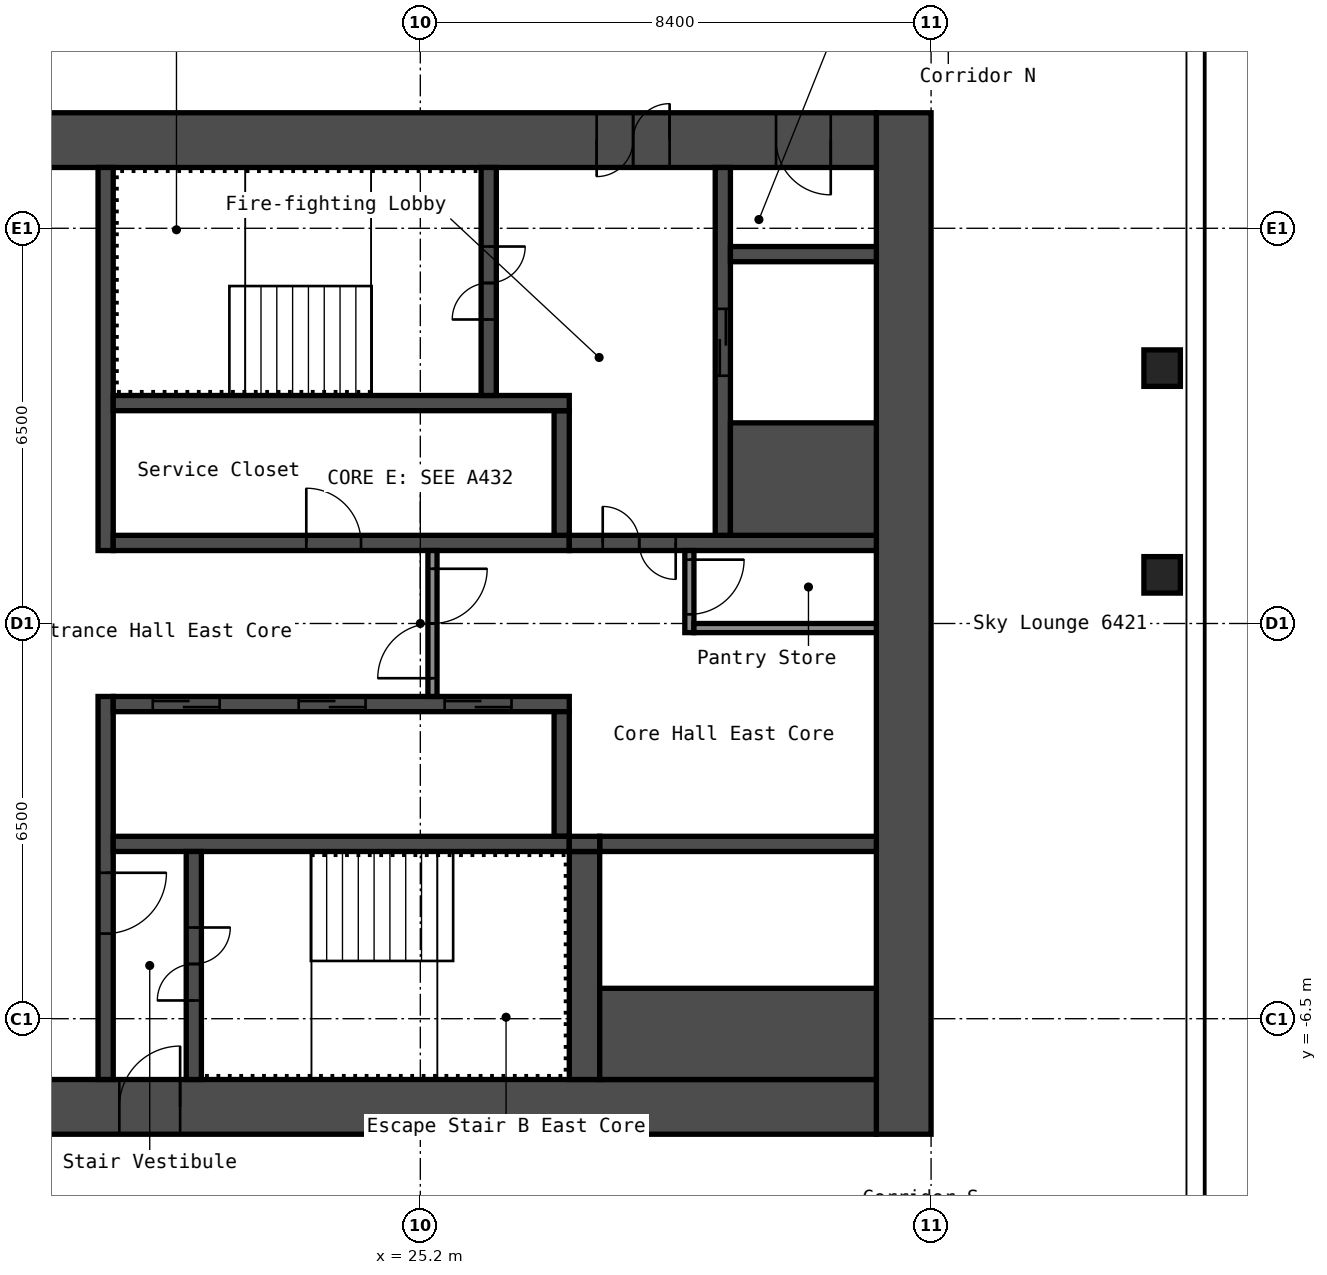
"""IFC4 building model, lengths in metres.
Left out: names, types, materials, properties, quantities, classifications, styles, units other than length and angle.
Written with IfcOpenShell. Run it as: python <this file> out.ifc"""

import sys

from ifc_helpers import new_model, si_unit, direction, frame, frame_2d, origin, origin_2d, place, context, subcontext, project, spatial, rectangle, hollow_rectangle, extrude, element, fill, save


model = new_model("IFC4")
c1 = context("Model", 3, precision=1e-05, world=origin(), true_north=direction((0.0, 1.0)))
c2 = subcontext(c1, "Body", "Model", "MODEL_VIEW")
j1 = project(units=[si_unit("LENGTHUNIT", "METRE"), si_unit("PLANEANGLEUNIT", "RADIAN")], contexts=[c1])
p1 = place(None, origin())
s1 = spatial("IfcSite", under=j1, at=p1, CompositionType="ELEMENT")
p2 = place(p1, origin())
s2 = spatial("IfcBuilding", under=s1, at=p2, CompositionType="ELEMENT")
p3 = place(p2, frame((0.0, 0.0, 225.0)))
s3 = spatial("IfcBuildingStorey", under=s2, at=p3, CompositionType="ELEMENT", Elevation=225.0)
for number, where, z_axis, x_axis in (
    (1, (37.4, 0.8, 0.0), (0.0, 0.0, 1.0), (1.0, 0.0, 0.0)),
    (2, (37.4, 4.2, 0.0), (0.0, 0.0, 1.0), (1.0, 0.0, 0.0)),
):
    element("IfcColumn", number, at=place(p3, frame(where, z_axis=z_axis, x_axis=x_axis)), inside=s3, PredefinedType="COLUMN", context=c2, shape_type="SweptSolid", body=[
        extrude(hollow_rectangle(XDim=0.6, YDim=0.6, WallThickness=0.025, InnerFilletRadius=0.038, OuterFilletRadius=0.062, at=origin_2d()), origin(), (0.0, 0.0, 1.0), 2.9),
    ])
p4 = place(p3, frame((33.15, -8.4, 0.0), z_axis=(0.0, 0.0, 1.0), x_axis=(0.0, 1.0, 0.0)))
e3 = element("IfcWall", 3, at=p4, inside=s3, PredefinedType="SHEAR", context=c2, shape_type="SweptSolid", body=[
    extrude(rectangle(XDim=16.8, YDim=0.9, at=frame_2d((8.4, 0.0))), origin(), (0.0, 0.0, 1.0), 2.9),
])
p5 = place(p3, frame((17.7, 7.95, 0.0), z_axis=(0.0, 0.0, 1.0), x_axis=(1.0, 0.0, 0.0)))
e4 = element("IfcWall", 4, at=p5, inside=s3, PredefinedType="SHEAR", context=c2, shape_type="SweptSolid", body=[
    extrude(rectangle(XDim=15.0, YDim=0.9, at=frame_2d((7.5, 0.0))), origin(), (0.0, 0.0, 1.0), 2.9),
])
p6 = place(p5, frame((10.4, 0.0, 0.0)))
e5 = element("IfcOpeningElement", 5, at=p6, cuts=e4, PredefinedType="OPENING", context=c2, shape_type="SweptSolid", body=[
    extrude(rectangle(XDim=1.2, YDim=2.1, at=frame_2d((0.6, 1.05))), frame((0.0, 0.46, 0.0), z_axis=(0.0, -1.0, 0.0), x_axis=(1.0, 0.0, 0.0)), (0.0, 0.0, 1.0), 0.92),
])
p7 = place(p5, frame((13.35, 0.0, 0.0)))
e6 = element("IfcOpeningElement", 6, at=p7, cuts=e4, PredefinedType="OPENING", context=c2, shape_type="SweptSolid", body=[
    extrude(rectangle(XDim=0.9, YDim=2.1, at=frame_2d((0.45, 1.05))), frame((0.0, 0.46, 0.0), z_axis=(0.0, -1.0, 0.0), x_axis=(1.0, 0.0, 0.0)), (0.0, 0.0, 1.0), 0.92),
])
p8 = place(p3, frame((17.7, -7.95, 0.0), z_axis=(0.0, 0.0, 1.0), x_axis=(1.0, 0.0, 0.0)))
e7 = element("IfcWall", 7, at=p8, inside=s3, PredefinedType="SHEAR", context=c2, shape_type="SweptSolid", body=[
    extrude(rectangle(XDim=15.0, YDim=0.9, at=frame_2d((7.5, 0.0))), origin(), (0.0, 0.0, 1.0), 2.9),
])
p9 = place(p8, frame((2.55, 0.0, 0.0)))
e8 = element("IfcOpeningElement", 8, at=p9, cuts=e7, PredefinedType="OPENING", context=c2, shape_type="SweptSolid", body=[
    extrude(rectangle(XDim=1.0, YDim=2.1, at=frame_2d((0.5, 1.05))), frame((0.0, 0.46, 0.0), z_axis=(0.0, -1.0, 0.0), x_axis=(1.0, 0.0, 0.0)), (0.0, 0.0, 1.0), 0.92),
])
p10 = place(p3, frame((20.025, 1.2, 0.0), z_axis=(0.0, 0.0, 1.0), x_axis=(0.0, 1.0, 0.0)))
e9 = element("IfcWall", 9, at=p10, inside=s3, PredefinedType="SHEAR", context=c2, shape_type="SweptSolid", body=[
    extrude(rectangle(XDim=6.3, YDim=0.25, at=frame_2d((3.15, 0.0))), origin(), (0.0, 0.0, 1.0), 2.9),
])
p11 = place(p3, frame((20.025, -7.5, 0.0), z_axis=(0.0, 0.0, 1.0), x_axis=(0.0, 1.0, 0.0)))
e10 = element("IfcWall", 10, at=p11, inside=s3, PredefinedType="SHEAR", context=c2, shape_type="SweptSolid", body=[
    extrude(rectangle(XDim=6.3, YDim=0.25, at=frame_2d((3.15, 0.0))), origin(), (0.0, 0.0, 1.0), 2.9),
])
p12 = place(p11, frame((2.4, 0.0, 0.0)))
e11 = element("IfcOpeningElement", 11, at=p12, cuts=e10, PredefinedType="OPENING", context=c2, shape_type="SweptSolid", body=[
    extrude(rectangle(XDim=1.0, YDim=2.1, at=frame_2d((0.5, 1.05))), frame((0.0, 0.135, 0.0), z_axis=(0.0, -1.0, 0.0), x_axis=(1.0, 0.0, 0.0)), (0.0, 0.0, 1.0), 0.27),
])
p13 = place(p3, frame((20.15, 1.325, 0.0), z_axis=(0.0, 0.0, 1.0), x_axis=(1.0, 0.0, 0.0)))
e12 = element("IfcWall", 12, at=p13, inside=s3, PredefinedType="SHEAR", context=c2, shape_type="SweptSolid", body=[
    extrude(rectangle(XDim=7.5, YDim=0.25, at=frame_2d((3.75, 0.0))), origin(), (0.0, 0.0, 1.0), 2.9),
])
p14 = place(p13, frame((3.175, 0.0, 0.0)))
e13 = element("IfcOpeningElement", 13, at=p14, cuts=e12, PredefinedType="OPENING", context=c2, shape_type="SweptSolid", body=[
    extrude(rectangle(XDim=0.9, YDim=2.1, at=frame_2d((0.45, 1.05))), frame((0.0, 0.135, 0.0), z_axis=(0.0, -1.0, 0.0), x_axis=(1.0, 0.0, 0.0)), (0.0, 0.0, 1.0), 0.27),
])
p15 = place(p3, frame((27.525, 1.45, 0.0), z_axis=(0.0, 0.0, 1.0), x_axis=(0.0, 1.0, 0.0)))
e14 = element("IfcWall", 14, at=p15, inside=s3, PredefinedType="SHEAR", context=c2, shape_type="SweptSolid", body=[
    extrude(rectangle(XDim=2.05, YDim=0.25, at=frame_2d((1.025, 0.0))), origin(), (0.0, 0.0, 1.0), 2.9),
])
p16 = place(p3, frame((20.15, 3.625, 0.0), z_axis=(0.0, 0.0, 1.0), x_axis=(1.0, 0.0, 0.0)))
e15 = element("IfcWall", 15, at=p16, inside=s3, PredefinedType="SHEAR", context=c2, shape_type="SweptSolid", body=[
    extrude(rectangle(XDim=7.5, YDim=0.25, at=frame_2d((3.75, 0.0))), origin(), (0.0, 0.0, 1.0), 2.9),
])
p17 = place(p3, frame((26.325, 3.75, 0.0), z_axis=(0.0, 0.0, 1.0), x_axis=(0.0, 1.0, 0.0)))
e16 = element("IfcWall", 16, at=p17, inside=s3, PredefinedType="SHEAR", context=c2, shape_type="SweptSolid", body=[
    extrude(rectangle(XDim=3.75, YDim=0.25, at=frame_2d((1.875, 0.0))), origin(), (0.0, 0.0, 1.0), 2.9),
])
p18 = place(p17, frame((1.25, 0.0, 0.0)))
e17 = element("IfcOpeningElement", 17, at=p18, cuts=e16, PredefinedType="OPENING", context=c2, shape_type="SweptSolid", body=[
    extrude(rectangle(XDim=1.2, YDim=2.1, at=frame_2d((0.6, 1.05))), frame((0.0, 0.135, 0.0), z_axis=(0.0, -1.0, 0.0), x_axis=(1.0, 0.0, 0.0)), (0.0, 0.0, 1.0), 0.27),
])
p19 = place(p3, frame((27.65, 1.325, 0.0), z_axis=(0.0, 0.0, 1.0), x_axis=(1.0, 0.0, 0.0)))
e18 = element("IfcWall", 18, at=p19, inside=s3, PredefinedType="SHEAR", context=c2, shape_type="SweptSolid", body=[
    extrude(rectangle(XDim=5.05, YDim=0.25, at=frame_2d((2.525, 0.0))), origin(), (0.0, 0.0, 1.0), 2.9),
])
p20 = place(p19, frame((0.55, 0.0, 0.0)))
e19 = element("IfcOpeningElement", 19, at=p20, cuts=e18, PredefinedType="OPENING", context=c2, shape_type="SweptSolid", body=[
    extrude(rectangle(XDim=1.2, YDim=2.1, at=frame_2d((0.6, 1.05))), frame((0.0, 0.135, 0.0), z_axis=(0.0, -1.0, 0.0), x_axis=(1.0, 0.0, 0.0)), (0.0, 0.0, 1.0), 0.27),
])
p21 = place(p3, frame((30.175, 1.45, 0.0), z_axis=(0.0, 0.0, 1.0), x_axis=(0.0, 1.0, 0.0)))
e20 = element("IfcWall", 20, at=p21, inside=s3, PredefinedType="SHEAR", context=c2, shape_type="SweptSolid", body=[
    extrude(rectangle(XDim=6.05, YDim=0.25, at=frame_2d((3.025, 0.0))), origin(), (0.0, 0.0, 1.0), 2.9),
])
p22 = place(p21, frame((2.625, 0.0, 0.0)))
e21 = element("IfcOpeningElement", 21, at=p22, cuts=e20, PredefinedType="OPENING", context=c2, shape_type="SweptSolid", body=[
    extrude(rectangle(XDim=1.1, YDim=2.1, at=frame_2d((0.55, 1.05))), frame((0.0, 0.135, 0.0), z_axis=(0.0, -1.0, 0.0), x_axis=(1.0, 0.0, 0.0)), (0.0, 0.0, 1.0), 0.27),
])
p23 = place(p3, frame((30.3, 2.375, 0.0), z_axis=(0.0, 0.0, 1.0), x_axis=(1.0, 0.0, 0.0)))
e22 = element("IfcWall", 22, at=p23, inside=s3, PredefinedType="SHEAR", context=c2, shape_type="SweptSolid", body=[
    extrude(rectangle(XDim=2.4, YDim=1.85, at=frame_2d((1.2, 0.0))), origin(), (0.0, 0.0, 1.0), 2.9),
])
p24 = place(p3, frame((30.3, 6.075, 0.0), z_axis=(0.0, 0.0, 1.0), x_axis=(1.0, 0.0, 0.0)))
e23 = element("IfcWall", 23, at=p24, inside=s3, PredefinedType="SHEAR", context=c2, shape_type="SweptSolid", body=[
    extrude(rectangle(XDim=2.4, YDim=0.25, at=frame_2d((1.2, 0.0))), origin(), (0.0, 0.0, 1.0), 2.9),
])
p25 = place(p3, frame((20.15, -1.325, 0.0), z_axis=(0.0, 0.0, 1.0), x_axis=(1.0, 0.0, 0.0)))
e24 = element("IfcWall", 24, at=p25, inside=s3, PredefinedType="SHEAR", context=c2, shape_type="SweptSolid", body=[
    extrude(rectangle(XDim=7.5, YDim=0.25, at=frame_2d((3.75, 0.0))), origin(), (0.0, 0.0, 1.0), 2.9),
])
p26 = place(p25, frame((0.65, 0.0, 0.0)))
e25 = element("IfcOpeningElement", 25, at=p26, cuts=e24, PredefinedType="OPENING", context=c2, shape_type="SweptSolid", body=[
    extrude(rectangle(XDim=1.1, YDim=2.1, at=frame_2d((0.55, 1.05))), frame((0.0, 0.135, 0.0), z_axis=(0.0, -1.0, 0.0), x_axis=(1.0, 0.0, 0.0)), (0.0, 0.0, 1.0), 0.27),
])
p27 = place(p25, frame((3.05, 0.0, 0.0)))
e26 = element("IfcOpeningElement", 26, at=p27, cuts=e24, PredefinedType="OPENING", context=c2, shape_type="SweptSolid", body=[
    extrude(rectangle(XDim=1.1, YDim=2.1, at=frame_2d((0.55, 1.05))), frame((0.0, 0.135, 0.0), z_axis=(0.0, -1.0, 0.0), x_axis=(1.0, 0.0, 0.0)), (0.0, 0.0, 1.0), 0.27),
])
p28 = place(p25, frame((5.45, 0.0, 0.0)))
e27 = element("IfcOpeningElement", 27, at=p28, cuts=e24, PredefinedType="OPENING", context=c2, shape_type="SweptSolid", body=[
    extrude(rectangle(XDim=1.1, YDim=2.1, at=frame_2d((0.55, 1.05))), frame((0.0, 0.135, 0.0), z_axis=(0.0, -1.0, 0.0), x_axis=(1.0, 0.0, 0.0)), (0.0, 0.0, 1.0), 0.27),
])
p29 = place(p3, frame((27.525, -3.5, 0.0), z_axis=(0.0, 0.0, 1.0), x_axis=(0.0, 1.0, 0.0)))
e28 = element("IfcWall", 28, at=p29, inside=s3, PredefinedType="SHEAR", context=c2, shape_type="SweptSolid", body=[
    extrude(rectangle(XDim=2.05, YDim=0.25, at=frame_2d((1.025, 0.0))), origin(), (0.0, 0.0, 1.0), 2.9),
])
p30 = place(p3, frame((20.15, -3.625, 0.0), z_axis=(0.0, 0.0, 1.0), x_axis=(1.0, 0.0, 0.0)))
e29 = element("IfcWall", 29, at=p30, inside=s3, PredefinedType="SHEAR", context=c2, shape_type="SweptSolid", body=[
    extrude(rectangle(XDim=7.5, YDim=0.25, at=frame_2d((3.75, 0.0))), origin(), (0.0, 0.0, 1.0), 2.9),
])
p31 = place(p3, frame((21.475, -7.5, 0.0), z_axis=(0.0, 0.0, 1.0), x_axis=(0.0, 1.0, 0.0)))
e30 = element("IfcWall", 30, at=p31, inside=s3, PredefinedType="SHEAR", context=c2, shape_type="SweptSolid", body=[
    extrude(rectangle(XDim=3.75, YDim=0.25, at=frame_2d((1.875, 0.0))), origin(), (0.0, 0.0, 1.0), 2.9),
])
p32 = place(p31, frame((1.3, 0.0, 0.0)))
e31 = element("IfcOpeningElement", 31, at=p32, cuts=e30, PredefinedType="OPENING", context=c2, shape_type="SweptSolid", body=[
    extrude(rectangle(XDim=1.2, YDim=2.1, at=frame_2d((0.6, 1.05))), frame((0.0, 0.135, 0.0), z_axis=(0.0, -1.0, 0.0), x_axis=(1.0, 0.0, 0.0)), (0.0, 0.0, 1.0), 0.27),
])
p33 = place(p3, frame((27.9, -7.5, 0.0), z_axis=(0.0, 0.0, 1.0), x_axis=(0.0, 1.0, 0.0)))
e32 = element("IfcWall", 32, at=p33, inside=s3, PredefinedType="SHEAR", context=c2, shape_type="SweptSolid", body=[
    extrude(rectangle(XDim=3.75, YDim=0.5, at=frame_2d((1.875, 0.0))), origin(), (0.0, 0.0, 1.0), 2.9),
])
p34 = place(p3, frame((28.15, -3.625, 0.0), z_axis=(0.0, 0.0, 1.0), x_axis=(1.0, 0.0, 0.0)))
e33 = element("IfcWall", 33, at=p34, inside=s3, PredefinedType="SHEAR", context=c2, shape_type="SweptSolid", body=[
    extrude(rectangle(XDim=4.55, YDim=0.25, at=frame_2d((2.275, 0.0))), origin(), (0.0, 0.0, 1.0), 2.9),
])
p35 = place(p3, frame((28.15, -6.75, 0.0), z_axis=(0.0, 0.0, 1.0), x_axis=(1.0, 0.0, 0.0)))
e34 = element("IfcWall", 34, at=p35, inside=s3, PredefinedType="SHEAR", context=c2, shape_type="SweptSolid", body=[
    extrude(rectangle(XDim=4.55, YDim=1.5, at=frame_2d((2.275, 0.0))), origin(), (0.0, 0.0, 1.0), 2.9),
])
p36 = place(p3, frame((27.65, -3.625, 0.0), z_axis=(0.0, 0.0, 1.0), x_axis=(1.0, 0.0, 0.0)))
e35 = element("IfcWall", 35, at=p36, inside=s3, PredefinedType="SHEAR", context=c2, shape_type="SweptSolid", body=[
    extrude(rectangle(XDim=0.5, YDim=0.25, at=frame_2d((0.25, 0.0))), origin(), (0.0, 0.0, 1.0), 2.9),
])
p37 = place(p3, frame((25.4, -1.2, 0.0), z_axis=(0.0, 0.0, 1.0), x_axis=(0.0, 1.0, 0.0)))
e36 = element("IfcWall", 36, at=p37, inside=s3, PredefinedType="PARTITIONING", context=c2, shape_type="SweptSolid", body=[
    extrude(rectangle(XDim=2.4, YDim=0.15, at=frame_2d((1.2, 0.0))), origin(), (0.0, 0.0, 1.0), 2.9),
])
p38 = place(p37, frame((0.3, 0.0, 0.0)))
e37 = element("IfcOpeningElement", 37, at=p38, cuts=e36, PredefinedType="OPENING", context=c2, shape_type="SweptSolid", body=[
    extrude(rectangle(XDim=1.8, YDim=2.1, at=frame_2d((0.9, 1.05))), frame((0.0, 0.085, 0.0), z_axis=(0.0, -1.0, 0.0), x_axis=(1.0, 0.0, 0.0)), (0.0, 0.0, 1.0), 0.17),
])
p39 = place(p3, frame((29.625, -0.15, 0.0), z_axis=(0.0, 0.0, 1.0), x_axis=(0.0, 1.0, 0.0)))
e38 = element("IfcWall", 38, at=p39, inside=s3, PredefinedType="PARTITIONING", context=c2, shape_type="SweptSolid", body=[
    extrude(rectangle(XDim=1.35, YDim=0.15, at=frame_2d((0.675, 0.0))), origin(), (0.0, 0.0, 1.0), 2.9),
])
p40 = place(p39, frame((0.3, 0.0, 0.0)))
e39 = element("IfcOpeningElement", 39, at=p40, cuts=e38, PredefinedType="OPENING", context=c2, shape_type="SweptSolid", body=[
    extrude(rectangle(XDim=0.9, YDim=2.1, at=frame_2d((0.45, 1.05))), frame((0.0, 0.085, 0.0), z_axis=(0.0, -1.0, 0.0), x_axis=(1.0, 0.0, 0.0)), (0.0, 0.0, 1.0), 0.17),
])
p41 = place(p3, frame((29.7, -0.075, 0.0), z_axis=(0.0, 0.0, 1.0), x_axis=(1.0, 0.0, 0.0)))
e40 = element("IfcWall", 40, at=p41, inside=s3, PredefinedType="PARTITIONING", context=c2, shape_type="SweptSolid", body=[
    extrude(rectangle(XDim=3.0, YDim=0.15, at=frame_2d((1.5, 0.0))), origin(), (0.0, 0.0, 1.0), 2.9),
])
p42 = place(p6, origin())
e41 = element("IfcDoor", 41, at=p42, inside=s3, OperationType="DOUBLE_DOOR_SINGLE_SWING", PredefinedType="DOOR", context=c2, shape_type="SweptSolid", body=[
    extrude(rectangle(XDim=1.2, YDim=2.1, at=frame_2d((0.6, 1.05))), frame((0.0, 0.025, 0.0), z_axis=(0.0, -1.0, 0.0), x_axis=(1.0, 0.0, 0.0)), (0.0, 0.0, 1.0), 0.05),
])
fill(e5, e41)
p43 = place(p7, origin())
e42 = element("IfcDoor", 42, at=p43, inside=s3, OperationType="SINGLE_SWING_RIGHT", PredefinedType="DOOR", context=c2, shape_type="SweptSolid", body=[
    extrude(rectangle(XDim=0.9, YDim=2.1, at=frame_2d((0.45, 1.05))), frame((0.0, 0.025, 0.0), z_axis=(0.0, -1.0, 0.0), x_axis=(1.0, 0.0, 0.0)), (0.0, 0.0, 1.0), 0.05),
])
fill(e6, e42)
p44 = place(p9, origin())
e43 = element("IfcDoor", 43, at=p44, inside=s3, OperationType="SINGLE_SWING_LEFT", PredefinedType="DOOR", context=c2, shape_type="SweptSolid", body=[
    extrude(rectangle(XDim=1.0, YDim=2.1, at=frame_2d((0.5, 1.05))), frame((0.0, 0.025, 0.0), z_axis=(0.0, -1.0, 0.0), x_axis=(1.0, 0.0, 0.0)), (0.0, 0.0, 1.0), 0.05),
])
fill(e8, e43)
p45 = place(p18, origin())
e44 = element("IfcDoor", 44, at=p45, inside=s3, OperationType="DOUBLE_DOOR_SINGLE_SWING", PredefinedType="DOOR", context=c2, shape_type="SweptSolid", body=[
    extrude(rectangle(XDim=1.2, YDim=2.1, at=frame_2d((0.6, 1.05))), frame((0.0, 0.025, 0.0), z_axis=(0.0, -1.0, 0.0), x_axis=(1.0, 0.0, 0.0)), (0.0, 0.0, 1.0), 0.05),
])
fill(e17, e44)
p46 = place(p32, origin())
e45 = element("IfcDoor", 45, at=p46, inside=s3, OperationType="DOUBLE_DOOR_SINGLE_SWING", PredefinedType="DOOR", context=c2, shape_type="SweptSolid", body=[
    extrude(rectangle(XDim=1.2, YDim=2.1, at=frame_2d((0.6, 1.05))), frame((0.0, 0.025, 0.0), z_axis=(0.0, -1.0, 0.0), x_axis=(1.0, 0.0, 0.0)), (0.0, 0.0, 1.0), 0.05),
])
fill(e31, e45)
p47 = place(p12, origin())
e46 = element("IfcDoor", 46, at=p47, inside=s3, OperationType="SINGLE_SWING_RIGHT", PredefinedType="DOOR", context=c2, shape_type="SweptSolid", body=[
    extrude(rectangle(XDim=1.0, YDim=2.1, at=frame_2d((0.5, 1.05))), frame((0.0, 0.025, 0.0), z_axis=(0.0, -1.0, 0.0), x_axis=(1.0, 0.0, 0.0)), (0.0, 0.0, 1.0), 0.05),
])
fill(e11, e46)
p48 = place(p20, origin())
e47 = element("IfcDoor", 47, at=p48, inside=s3, OperationType="DOUBLE_DOOR_SINGLE_SWING", PredefinedType="DOOR", context=c2, shape_type="SweptSolid", body=[
    extrude(rectangle(XDim=1.2, YDim=2.1, at=frame_2d((0.6, 1.05))), frame((0.0, 0.025, 0.0), z_axis=(0.0, -1.0, 0.0), x_axis=(1.0, 0.0, 0.0)), (0.0, 0.0, 1.0), 0.05),
])
fill(e19, e47)
p49 = place(p38, origin())
e48 = element("IfcDoor", 48, at=p49, inside=s3, OperationType="DOUBLE_DOOR_SINGLE_SWING", PredefinedType="DOOR", context=c2, shape_type="SweptSolid", body=[
    extrude(rectangle(XDim=1.8, YDim=2.1, at=frame_2d((0.9, 1.05))), frame((0.0, 0.025, 0.0), z_axis=(0.0, -1.0, 0.0), x_axis=(1.0, 0.0, 0.0)), (0.0, 0.0, 1.0), 0.05),
])
fill(e37, e48)
p50 = place(p40, origin())
e49 = element("IfcDoor", 49, at=p50, inside=s3, OperationType="SINGLE_SWING_RIGHT", PredefinedType="DOOR", context=c2, shape_type="SweptSolid", body=[
    extrude(rectangle(XDim=0.9, YDim=2.1, at=frame_2d((0.45, 1.05))), frame((0.0, 0.025, 0.0), z_axis=(0.0, -1.0, 0.0), x_axis=(1.0, 0.0, 0.0)), (0.0, 0.0, 1.0), 0.05),
])
fill(e39, e49)
p51 = place(p14, origin())
e50 = element("IfcDoor", 50, at=p51, inside=s3, OperationType="SINGLE_SWING_RIGHT", PredefinedType="DOOR", context=c2, shape_type="SweptSolid", body=[
    extrude(rectangle(XDim=0.9, YDim=2.1, at=frame_2d((0.45, 1.05))), frame((0.0, 0.025, 0.0), z_axis=(0.0, -1.0, 0.0), x_axis=(1.0, 0.0, 0.0)), (0.0, 0.0, 1.0), 0.05),
])
fill(e13, e50)
p52 = place(p26, origin())
e51 = element("IfcDoor", 51, at=p52, inside=s3, OperationType="DOUBLE_DOOR_SLIDING", PredefinedType="DOOR", context=c2, shape_type="SweptSolid", body=[
    extrude(rectangle(XDim=1.1, YDim=2.1, at=frame_2d((0.55, 1.05))), frame((0.0, 0.025, 0.0), z_axis=(0.0, -1.0, 0.0), x_axis=(1.0, 0.0, 0.0)), (0.0, 0.0, 1.0), 0.05),
])
fill(e25, e51)
p53 = place(p27, origin())
e52 = element("IfcDoor", 52, at=p53, inside=s3, OperationType="DOUBLE_DOOR_SLIDING", PredefinedType="DOOR", context=c2, shape_type="SweptSolid", body=[
    extrude(rectangle(XDim=1.1, YDim=2.1, at=frame_2d((0.55, 1.05))), frame((0.0, 0.025, 0.0), z_axis=(0.0, -1.0, 0.0), x_axis=(1.0, 0.0, 0.0)), (0.0, 0.0, 1.0), 0.05),
])
fill(e26, e52)
p54 = place(p28, origin())
e53 = element("IfcDoor", 53, at=p54, inside=s3, OperationType="DOUBLE_DOOR_SLIDING", PredefinedType="DOOR", context=c2, shape_type="SweptSolid", body=[
    extrude(rectangle(XDim=1.1, YDim=2.1, at=frame_2d((0.55, 1.05))), frame((0.0, 0.025, 0.0), z_axis=(0.0, -1.0, 0.0), x_axis=(1.0, 0.0, 0.0)), (0.0, 0.0, 1.0), 0.05),
])
fill(e27, e53)
p55 = place(p22, origin())
e54 = element("IfcDoor", 54, at=p55, inside=s3, OperationType="DOUBLE_DOOR_SLIDING", PredefinedType="DOOR", context=c2, shape_type="SweptSolid", body=[
    extrude(rectangle(XDim=1.1, YDim=2.1, at=frame_2d((0.55, 1.05))), frame((0.0, 0.025, 0.0), z_axis=(0.0, -1.0, 0.0), x_axis=(1.0, 0.0, 0.0)), (0.0, 0.0, 1.0), 0.05),
])
fill(e21, e54)
save(model, sys.argv[1])
